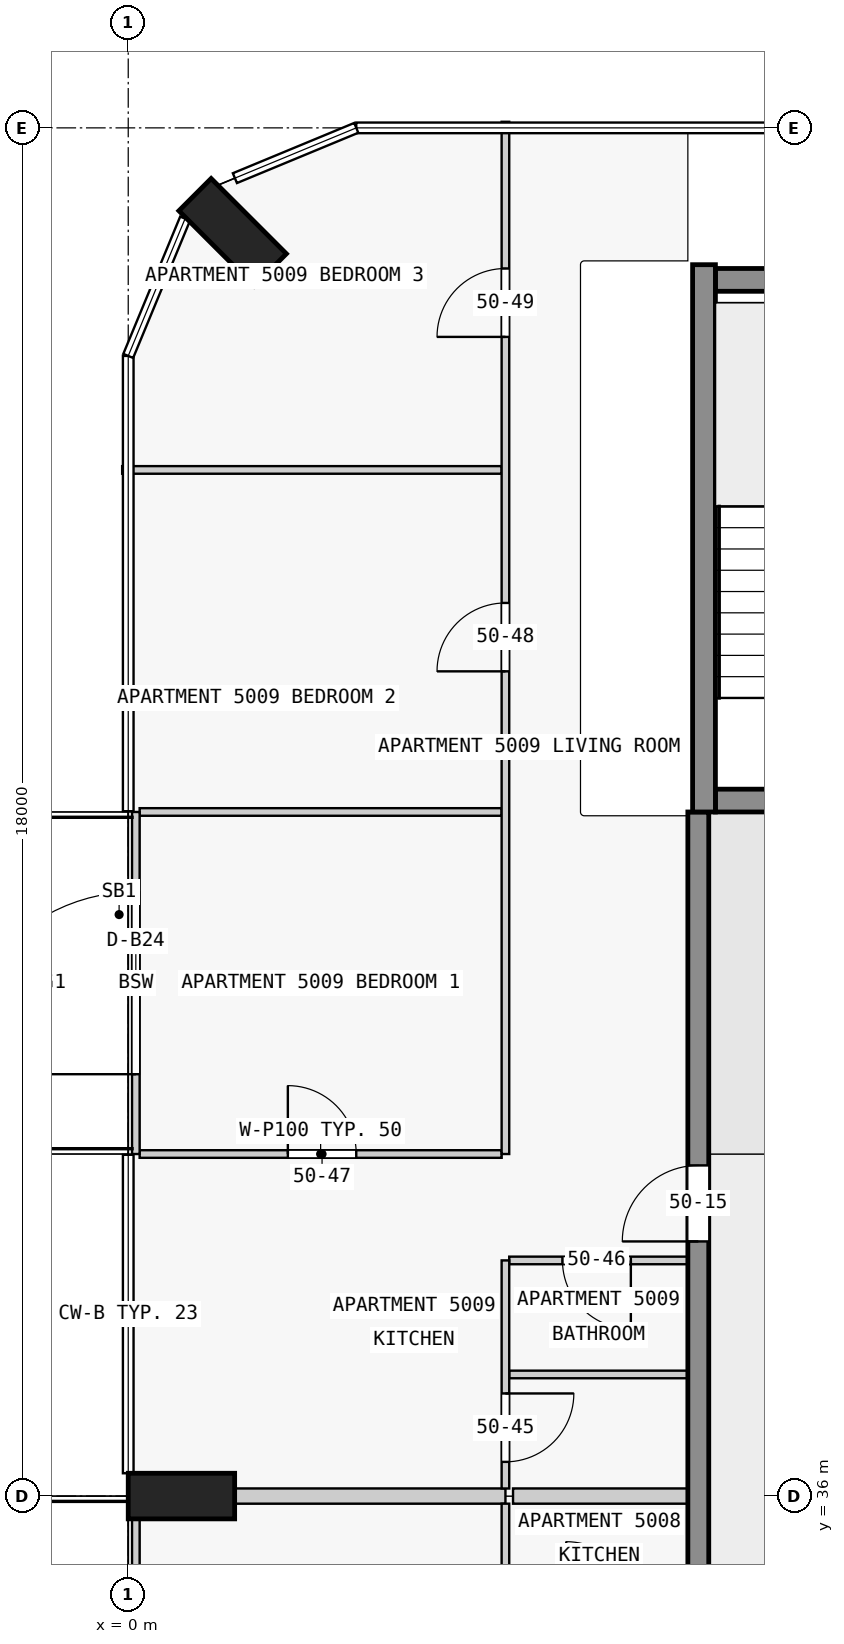
"""IFC4 building model, lengths in metres.
Left out: names, types, materials, properties, quantities, classifications, styles, units other than length and angle.
Written with IfcOpenShell. Run it as: python <this file> out.ifc"""

import sys

from ifc_helpers import new_model, si_unit, direction, frame, frame_2d, origin, origin_2d, place, context, subcontext, project, spatial, rectangle, extrude, element, fill, save


model = new_model("IFC4")
c1 = context("Model", 3, precision=1e-05, world=origin(), true_north=direction((0.0, 1.0)))
c2 = subcontext(c1, "Body", "Model", "MODEL_VIEW")
j1 = project(units=[si_unit("LENGTHUNIT", "METRE"), si_unit("PLANEANGLEUNIT", "RADIAN")], contexts=[c1])
p1 = place(None, origin())
s1 = spatial("IfcSite", under=j1, at=p1, CompositionType="ELEMENT")
p2 = place(p1, origin())
s2 = spatial("IfcBuilding", under=s1, at=p2, CompositionType="ELEMENT")
p3 = place(p2, frame((0.0, 0.0, 194.4)))
s3 = spatial("IfcBuildingStorey", under=s2, at=p3, CompositionType="ELEMENT", Elevation=194.4)
for number, where, z_axis, x_axis in (
    (1, (1.374, 52.626, 0.0), (0.0, 0.0, 1.0), (0.707, 0.707, 0.0)),
    (2, (0.7, 36.0, 0.0), (0.0, 0.0, 1.0), (0.0, 1.0, 0.0)),
):
    element("IfcColumn", number, at=place(p3, frame(where, z_axis=z_axis, x_axis=x_axis)), inside=s3, PredefinedType="COLUMN", context=c2, shape_type="SweptSolid", body=[
        extrude(rectangle(XDim=0.6, YDim=1.4, at=origin_2d()), origin(), (0.0, 0.0, 1.0), 3.5),
    ])
p4 = place(p3, frame((7.725, 45.15, 0.0), z_axis=(0.0, 0.0, 1.0), x_axis=(1.0, 0.0, 0.0)))
e3 = element("IfcWall", 3, at=p4, inside=s3, PredefinedType="SHEAR", context=c2, shape_type="SweptSolid", body=[
    extrude(rectangle(XDim=2.55, YDim=0.3, at=frame_2d((1.275, 0.0))), origin(), (0.0, 0.0, 1.0), 3.5),
])
p5 = place(p4, frame((0.725, 0.0, 0.0)))
e4 = element("IfcOpeningElement", 4, at=p5, cuts=e3, PredefinedType="OPENING", context=c2, shape_type="SweptSolid", body=[
    extrude(rectangle(XDim=1.1, YDim=2.1, at=frame_2d((0.55, 1.05))), frame((0.0, 0.16, 0.0), z_axis=(0.0, -1.0, 0.0), x_axis=(1.0, 0.0, 0.0)), (0.0, 0.0, 1.0), 0.32),
])
p6 = place(p3, frame((7.725, 52.0, 0.0), z_axis=(0.0, 0.0, 1.0), x_axis=(1.0, 0.0, 0.0)))
e5 = element("IfcWall", 5, at=p6, inside=s3, PredefinedType="SHEAR", context=c2, shape_type="SweptSolid", body=[
    extrude(rectangle(XDim=2.55, YDim=0.3, at=frame_2d((1.275, 0.0))), origin(), (0.0, 0.0, 1.0), 3.5),
])
p7 = place(p3, frame((7.575, 45.0, 0.0), z_axis=(0.0, 0.0, 1.0), x_axis=(0.0, 1.0, 0.0)))
e6 = element("IfcWall", 6, at=p7, inside=s3, PredefinedType="SHEAR", context=c2, shape_type="SweptSolid", body=[
    extrude(rectangle(XDim=7.2, YDim=0.3, at=frame_2d((3.6, 0.0))), origin(), (0.0, 0.0, 1.0), 3.5),
])
p8 = place(p3, frame((7.5, 18.0, 0.0), z_axis=(0.0, 0.0, 1.0), x_axis=(0.0, 1.0, 0.0)))
e7 = element("IfcWall", 7, at=p8, inside=s3, PredefinedType="SHEAR", context=c2, shape_type="SweptSolid", body=[
    extrude(rectangle(XDim=27.0, YDim=0.275, at=frame_2d((13.5, 0.0))), origin(), (0.0, 0.0, 1.0), 3.25),
])
p9 = place(p8, frame((1.75, 0.0, 0.0)))
e8 = element("IfcOpeningElement", 8, at=p9, cuts=e7, PredefinedType="OPENING", context=c2, shape_type="SweptSolid", body=[
    extrude(rectangle(XDim=1.0, YDim=2.1, at=frame_2d((0.5, 1.05))), frame((0.0, 0.147, 0.0), z_axis=(0.0, -1.0, 0.0), x_axis=(1.0, 0.0, 0.0)), (0.0, 0.0, 1.0), 0.295),
])
p10 = place(p8, frame((5.85, 0.0, 0.0)))
e9 = element("IfcOpeningElement", 9, at=p10, cuts=e7, PredefinedType="OPENING", context=c2, shape_type="SweptSolid", body=[
    extrude(rectangle(XDim=1.8, YDim=2.1, at=frame_2d((0.9, 1.05))), frame((0.0, 0.147, 0.0), z_axis=(0.0, -1.0, 0.0), x_axis=(1.0, 0.0, 0.0)), (0.0, 0.0, 1.0), 0.295),
])
p11 = place(p8, frame((10.75, 0.0, 0.0)))
e10 = element("IfcOpeningElement", 10, at=p11, cuts=e7, PredefinedType="OPENING", context=c2, shape_type="SweptSolid", body=[
    extrude(rectangle(XDim=1.0, YDim=2.1, at=frame_2d((0.5, 1.05))), frame((0.0, 0.147, 0.0), z_axis=(0.0, -1.0, 0.0), x_axis=(1.0, 0.0, 0.0)), (0.0, 0.0, 1.0), 0.295),
])
p12 = place(p8, frame((15.25, 0.0, 0.0)))
e11 = element("IfcOpeningElement", 11, at=p12, cuts=e7, PredefinedType="OPENING", context=c2, shape_type="SweptSolid", body=[
    extrude(rectangle(XDim=1.0, YDim=2.1, at=frame_2d((0.5, 1.05))), frame((0.0, 0.147, 0.0), z_axis=(0.0, -1.0, 0.0), x_axis=(1.0, 0.0, 0.0)), (0.0, 0.0, 1.0), 0.295),
])
p13 = place(p8, frame((21.35, 0.0, 0.0)))
e12 = element("IfcOpeningElement", 12, at=p13, cuts=e7, PredefinedType="OPENING", context=c2, shape_type="SweptSolid", body=[
    extrude(rectangle(XDim=1.0, YDim=2.1, at=frame_2d((0.5, 1.05))), frame((0.0, 0.147, 0.0), z_axis=(0.0, -1.0, 0.0), x_axis=(1.0, 0.0, 0.0)), (0.0, 0.0, 1.0), 0.295),
])
p14 = place(p3, frame((0.1, 31.5, 0.0), z_axis=(0.0, 0.0, 1.0), x_axis=(0.0, 1.0, 0.0)))
e13 = element("IfcWall", 13, at=p14, inside=s3, PredefinedType="STANDARD", context=c2, shape_type="SweptSolid", body=[
    extrude(rectangle(XDim=4.5, YDim=0.1, at=frame_2d((2.25, 0.0))), origin(), (0.0, 0.0, 1.0), 3.25),
])
p15 = place(p14, frame((1.05, 0.0, 0.0)))
e14 = element("IfcOpeningElement", 14, at=p15, cuts=e13, PredefinedType="OPENING", context=c2, shape_type="SweptSolid", body=[
    extrude(rectangle(XDim=2.4, YDim=2.4, at=frame_2d((1.2, 1.2))), frame((0.0, 0.06, 0.0), z_axis=(0.0, -1.0, 0.0), x_axis=(1.0, 0.0, 0.0)), (0.0, 0.0, 1.0), 0.12),
])
p16 = place(p3, frame((0.1, 40.5, 0.0), z_axis=(0.0, 0.0, 1.0), x_axis=(0.0, 1.0, 0.0)))
e15 = element("IfcWall", 15, at=p16, inside=s3, PredefinedType="STANDARD", context=c2, shape_type="SweptSolid", body=[
    extrude(rectangle(XDim=4.5, YDim=0.1, at=frame_2d((2.25, 0.0))), origin(), (0.0, 0.0, 1.0), 3.25),
])
p17 = place(p16, frame((1.05, 0.0, 0.0)))
e16 = element("IfcOpeningElement", 16, at=p17, cuts=e15, PredefinedType="OPENING", context=c2, shape_type="SweptSolid", body=[
    extrude(rectangle(XDim=2.4, YDim=2.4, at=frame_2d((1.2, 1.2))), frame((0.0, 0.06, 0.0), z_axis=(0.0, -1.0, 0.0), x_axis=(1.0, 0.0, 0.0)), (0.0, 0.0, 1.0), 0.12),
])
p18 = place(p3, frame((7.363, 36.0, 0.0), z_axis=(0.0, 0.0, 1.0), x_axis=(-1.0, 0.0, 0.0)))
e17 = element("IfcWall", 17, at=p18, inside=s3, PredefinedType="PARTITIONING", context=c2, shape_type="SweptSolid", body=[
    extrude(rectangle(XDim=2.3, YDim=0.2, at=frame_2d((1.15, 0.0))), origin(), (0.0, 0.0, 1.0), 3.25),
])
p19 = place(p3, frame((1.4, 36.0, 0.0), z_axis=(0.0, 0.0, 1.0), x_axis=(1.0, 0.0, 0.0)))
e18 = element("IfcWall", 18, at=p19, inside=s3, PredefinedType="PARTITIONING", context=c2, shape_type="SweptSolid", body=[
    extrude(rectangle(XDim=3.562, YDim=0.2, at=frame_2d((1.781, 0.0))), origin(), (0.0, 0.0, 1.0), 3.25),
])
p20 = place(p3, frame((7.363, 37.6, 0.0), z_axis=(0.0, 0.0, 1.0), x_axis=(-1.0, 0.0, 0.0)))
e19 = element("IfcWall", 19, at=p20, inside=s3, PredefinedType="PARTITIONING", context=c2, shape_type="SweptSolid", body=[
    extrude(rectangle(XDim=2.35, YDim=0.1, at=frame_2d((1.175, 0.0))), origin(), (0.0, 0.0, 1.0), 3.25),
])
p21 = place(p3, frame((7.363, 39.1, 0.0), z_axis=(0.0, 0.0, 1.0), x_axis=(-1.0, 0.0, 0.0)))
e20 = element("IfcWall", 20, at=p21, inside=s3, PredefinedType="PARTITIONING", context=c2, shape_type="SweptSolid", body=[
    extrude(rectangle(XDim=2.35, YDim=0.1, at=frame_2d((1.175, 0.0))), origin(), (0.0, 0.0, 1.0), 3.25),
])
p22 = place(p21, frame((0.75, 0.0, 0.0)))
e21 = element("IfcOpeningElement", 21, at=p22, cuts=e20, PredefinedType="OPENING", context=c2, shape_type="SweptSolid", body=[
    extrude(rectangle(XDim=0.9, YDim=2.1, at=frame_2d((0.45, 1.05))), frame((0.0, 0.06, 0.0), z_axis=(0.0, -1.0, 0.0), x_axis=(1.0, 0.0, 0.0)), (0.0, 0.0, 1.0), 0.12),
])
p23 = place(p3, frame((0.15, 40.5, 0.0), z_axis=(0.0, 0.0, 1.0), x_axis=(1.0, 0.0, 0.0)))
e22 = element("IfcWall", 22, at=p23, inside=s3, PredefinedType="PARTITIONING", context=c2, shape_type="SweptSolid", body=[
    extrude(rectangle(XDim=4.763, YDim=0.1, at=frame_2d((2.381, 0.0))), origin(), (0.0, 0.0, 1.0), 3.25),
])
p24 = place(p23, frame((1.95, 0.0, 0.0)))
e23 = element("IfcOpeningElement", 23, at=p24, cuts=e22, PredefinedType="OPENING", context=c2, shape_type="SweptSolid", body=[
    extrude(rectangle(XDim=0.9, YDim=2.1, at=frame_2d((0.45, 1.05))), frame((0.0, 0.06, 0.0), z_axis=(0.0, -1.0, 0.0), x_axis=(1.0, 0.0, 0.0)), (0.0, 0.0, 1.0), 0.12),
])
p25 = place(p3, frame((4.913, 45.0, 0.0), z_axis=(0.0, 0.0, 1.0), x_axis=(-1.0, 0.0, 0.0)))
e24 = element("IfcWall", 24, at=p25, inside=s3, PredefinedType="PARTITIONING", context=c2, shape_type="SweptSolid", body=[
    extrude(rectangle(XDim=4.763, YDim=0.1, at=frame_2d((2.381, 0.0))), origin(), (0.0, 0.0, 1.0), 3.25),
])
p26 = place(p3, frame((4.913, 49.5, 0.0), z_axis=(0.0, 0.0, 1.0), x_axis=(-1.0, 0.0, 0.0)))
e25 = element("IfcWall", 25, at=p26, inside=s3, PredefinedType="PARTITIONING", context=c2, shape_type="SweptSolid", body=[
    extrude(rectangle(XDim=4.993, YDim=0.1, at=frame_2d((2.496, 0.0))), origin(), (0.0, 0.0, 1.0), 3.25),
])
p27 = place(p3, frame((4.962, 35.9, 0.0), z_axis=(0.0, 0.0, 1.0), x_axis=(0.0, -1.0, 0.0)))
e26 = element("IfcWall", 26, at=p27, inside=s3, PredefinedType="PARTITIONING", context=c2, shape_type="SweptSolid", body=[
    extrude(rectangle(XDim=1.4, YDim=0.1, at=frame_2d((0.7, 0.0))), origin(), (0.0, 0.0, 1.0), 3.25),
])
p28 = place(p3, frame((4.962, 39.1, 0.0), z_axis=(0.0, 0.0, 1.0), x_axis=(0.0, -1.0, 0.0)))
e27 = element("IfcWall", 27, at=p28, inside=s3, PredefinedType="PARTITIONING", context=c2, shape_type="SweptSolid", body=[
    extrude(rectangle(XDim=3.0, YDim=0.1, at=frame_2d((1.5, 0.0))), origin(), (0.0, 0.0, 1.0), 3.25),
])
p29 = place(p28, frame((1.75, 0.0, 0.0)))
e28 = element("IfcOpeningElement", 28, at=p29, cuts=e27, PredefinedType="OPENING", context=c2, shape_type="SweptSolid", body=[
    extrude(rectangle(XDim=0.9, YDim=2.1, at=frame_2d((0.45, 1.05))), frame((0.0, 0.06, 0.0), z_axis=(0.0, -1.0, 0.0), x_axis=(1.0, 0.0, 0.0)), (0.0, 0.0, 1.0), 0.12),
])
p30 = place(p3, frame((4.962, 40.5, 0.0), z_axis=(0.0, 0.0, 1.0), x_axis=(0.0, 1.0, 0.0)))
e29 = element("IfcWall", 29, at=p30, inside=s3, PredefinedType="PARTITIONING", context=c2, shape_type="SweptSolid", body=[
    extrude(rectangle(XDim=13.58, YDim=0.1, at=frame_2d((6.79, 0.0))), origin(), (0.0, 0.0, 1.0), 3.25),
])
p31 = place(p30, frame((6.35, 0.0, 0.0)))
e30 = element("IfcOpeningElement", 30, at=p31, cuts=e29, PredefinedType="OPENING", context=c2, shape_type="SweptSolid", body=[
    extrude(rectangle(XDim=0.9, YDim=2.1, at=frame_2d((0.45, 1.05))), frame((0.0, 0.06, 0.0), z_axis=(0.0, -1.0, 0.0), x_axis=(1.0, 0.0, 0.0)), (0.0, 0.0, 1.0), 0.12),
])
p32 = place(p30, frame((10.75, 0.0, 0.0)))
e31 = element("IfcOpeningElement", 31, at=p32, cuts=e29, PredefinedType="OPENING", context=c2, shape_type="SweptSolid", body=[
    extrude(rectangle(XDim=0.9, YDim=2.1, at=frame_2d((0.45, 1.05))), frame((0.0, 0.06, 0.0), z_axis=(0.0, -1.0, 0.0), x_axis=(1.0, 0.0, 0.0)), (0.0, 0.0, 1.0), 0.12),
])
p33 = place(p17, origin())
e32 = element("IfcDoor", 32, at=p33, inside=s3, OperationType="SINGLE_SWING_LEFT", PredefinedType="DOOR", context=c2, shape_type="SweptSolid", body=[
    extrude(rectangle(XDim=2.4, YDim=2.4, at=frame_2d((1.2, 1.2))), frame((0.0, 0.025, 0.0), z_axis=(0.0, -1.0, 0.0), x_axis=(1.0, 0.0, 0.0)), (0.0, 0.0, 1.0), 0.05),
])
fill(e16, e32)
p34 = place(p13, origin())
e33 = element("IfcDoor", 33, at=p34, inside=s3, OperationType="SINGLE_SWING_RIGHT", PredefinedType="DOOR", context=c2, shape_type="SweptSolid", body=[
    extrude(rectangle(XDim=1.0, YDim=2.1, at=frame_2d((0.5, 1.05))), frame((0.0, 0.025, 0.0), z_axis=(0.0, -1.0, 0.0), x_axis=(1.0, 0.0, 0.0)), (0.0, 0.0, 1.0), 0.05),
])
fill(e12, e33)
p35 = place(p29, origin())
e34 = element("IfcDoor", 34, at=p35, inside=s3, OperationType="SINGLE_SWING_RIGHT", PredefinedType="DOOR", context=c2, shape_type="SweptSolid", body=[
    extrude(rectangle(XDim=0.9, YDim=2.1, at=frame_2d((0.45, 1.05))), frame((0.0, 0.025, 0.0), z_axis=(0.0, -1.0, 0.0), x_axis=(1.0, 0.0, 0.0)), (0.0, 0.0, 1.0), 0.05),
])
fill(e28, e34)
p36 = place(p22, origin())
e35 = element("IfcDoor", 35, at=p36, inside=s3, OperationType="SINGLE_SWING_RIGHT", PredefinedType="DOOR", context=c2, shape_type="SweptSolid", body=[
    extrude(rectangle(XDim=0.9, YDim=2.1, at=frame_2d((0.45, 1.05))), frame((0.0, 0.025, 0.0), z_axis=(0.0, -1.0, 0.0), x_axis=(1.0, 0.0, 0.0)), (0.0, 0.0, 1.0), 0.05),
])
fill(e21, e35)
p37 = place(p24, origin())
e36 = element("IfcDoor", 36, at=p37, inside=s3, OperationType="SINGLE_SWING_RIGHT", PredefinedType="DOOR", context=c2, shape_type="SweptSolid", body=[
    extrude(rectangle(XDim=0.9, YDim=2.1, at=frame_2d((0.45, 1.05))), frame((0.0, 0.025, 0.0), z_axis=(0.0, -1.0, 0.0), x_axis=(1.0, 0.0, 0.0)), (0.0, 0.0, 1.0), 0.05),
])
fill(e23, e36)
p38 = place(p31, origin())
e37 = element("IfcDoor", 37, at=p38, inside=s3, OperationType="SINGLE_SWING_RIGHT", PredefinedType="DOOR", context=c2, shape_type="SweptSolid", body=[
    extrude(rectangle(XDim=0.9, YDim=2.1, at=frame_2d((0.45, 1.05))), frame((0.0, 0.025, 0.0), z_axis=(0.0, -1.0, 0.0), x_axis=(1.0, 0.0, 0.0)), (0.0, 0.0, 1.0), 0.05),
])
fill(e30, e37)
p39 = place(p32, origin())
e38 = element("IfcDoor", 38, at=p39, inside=s3, OperationType="SINGLE_SWING_RIGHT", PredefinedType="DOOR", context=c2, shape_type="SweptSolid", body=[
    extrude(rectangle(XDim=0.9, YDim=2.1, at=frame_2d((0.45, 1.05))), frame((0.0, 0.025, 0.0), z_axis=(0.0, -1.0, 0.0), x_axis=(1.0, 0.0, 0.0)), (0.0, 0.0, 1.0), 0.05),
])
fill(e31, e38)
save(model, sys.argv[1])
